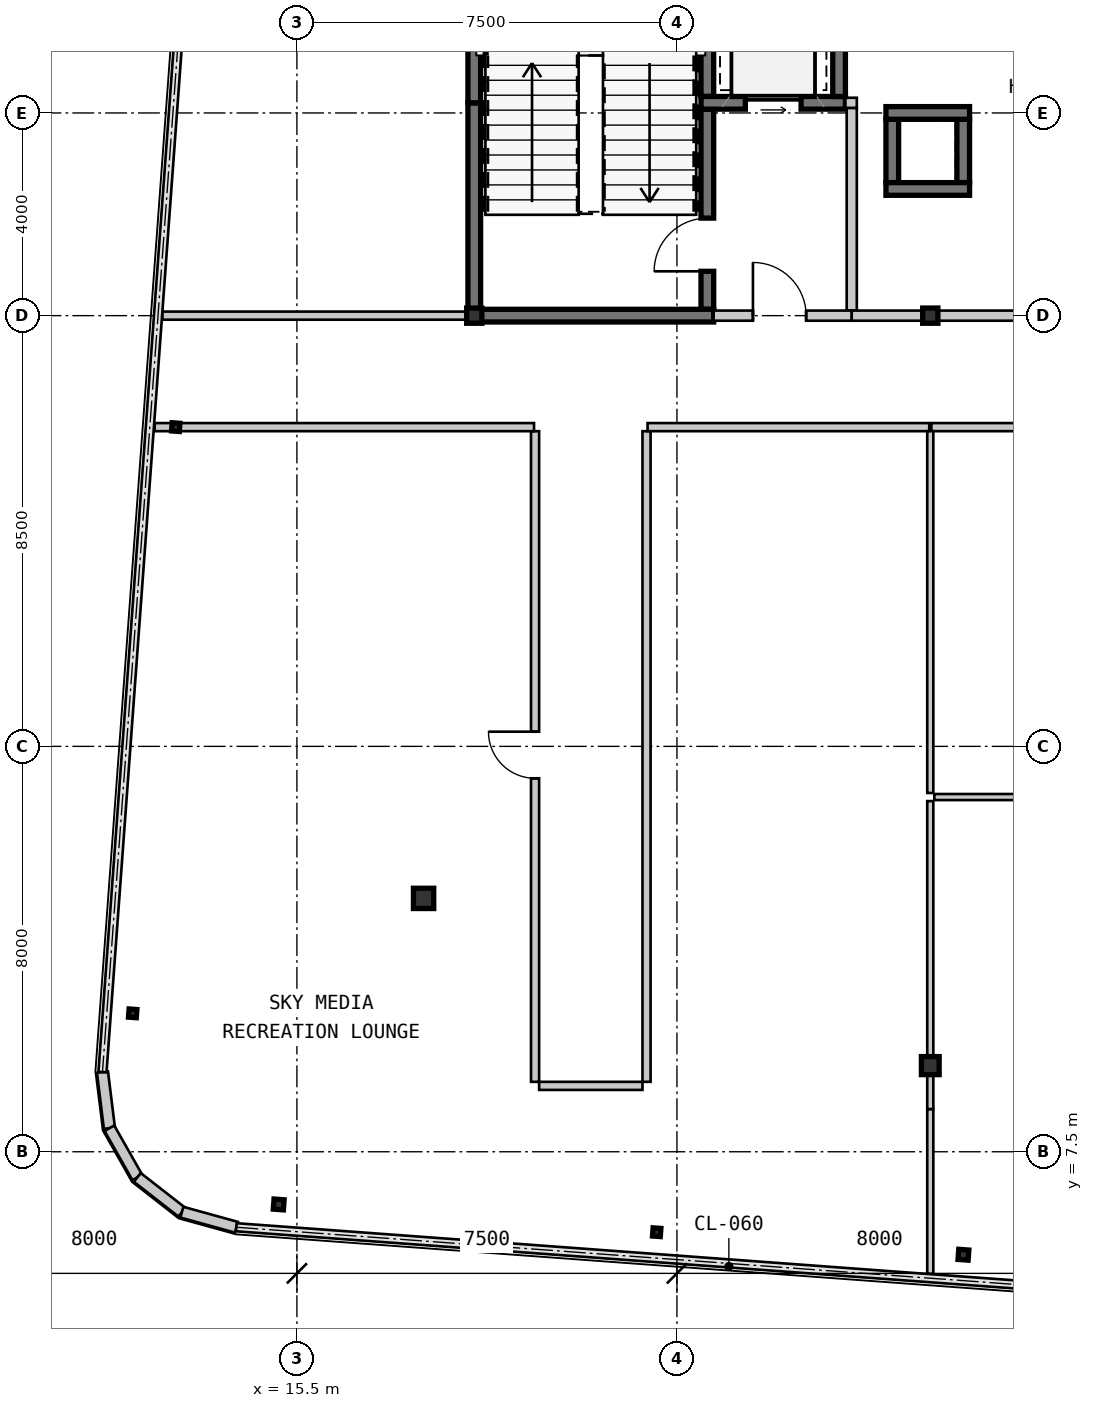
"""IFC4 building model, lengths in metres.
Left out: names, types, materials, properties, quantities, classifications, styles, units other than length and angle.
Written with IfcOpenShell. Run it as: python <this file> out.ifc"""

import sys

from ifc_helpers import new_model, si_unit, direction, frame, frame_2d, origin, origin_2d, place, context, subcontext, project, spatial, rectangle, hollow_rectangle, i_section, extrude, source, transform, mapped, element, fill, save


model = new_model("IFC4")
c1 = context("Model", 3, precision=1e-05, world=origin(), true_north=direction((0.0, 1.0)))
c2 = subcontext(c1, "Body", "Model", "MODEL_VIEW")
j1 = project(units=[si_unit("LENGTHUNIT", "METRE"), si_unit("PLANEANGLEUNIT", "RADIAN")], contexts=[c1])
p1 = place(None, origin())
s1 = spatial("IfcSite", under=j1, at=p1, CompositionType="ELEMENT")
p2 = place(p1, origin())
s2 = spatial("IfcBuilding", under=s1, at=p2, CompositionType="ELEMENT")
p3 = place(p2, frame((0.0, 0.0, 236.6)))
s3 = spatial("IfcBuildingStorey", under=s2, at=p3, CompositionType="ELEMENT", Elevation=236.6)
m1 = source(origin(), c2, "Body", "SweptSolid", [
    extrude(hollow_rectangle(XDim=0.3, YDim=0.3, WallThickness=0.012, at=origin_2d()), origin(), (0.0, 0.0, 1.0), 3.15),
])
for number, where, z_axis, x_axis in (
    (1, (19.0, 24.0, 0.0), (0.0, 0.0, 1.0), (1.0, 0.0, 0.0)),
    (2, (28.0, 24.0, 0.0), (0.0, 0.0, 1.0), (1.0, 0.0, 0.0)),
):
    element("IfcColumn", number, at=place(p3, frame(where, z_axis=z_axis, x_axis=x_axis)), inside=s3, PredefinedType="COLUMN", context=c2, shape_type="MappedRepresentation", body=[
        mapped(m1, transform((0.0, 0.0, 0.0), scale=1.0)),
    ])
m2 = source(origin(), c2, "Body", "SweptSolid", [
    extrude(i_section(OverallWidth=0.35, OverallDepth=0.356, WebThickness=0.018, FlangeThickness=0.028, at=origin_2d()), origin(), (0.0, 0.0, 1.0), 3.15),
])
p4 = place(p3, frame((28.0, 9.2, 0.0), z_axis=(0.0, 0.0, 1.0), x_axis=(1.0, 0.0, 0.0)))
e3 = element("IfcColumn", 3, at=p4, inside=s3, PredefinedType="COLUMN", context=c2, shape_type="MappedRepresentation", body=[
    mapped(m2, transform((0.0, 0.0, 0.0), scale=1.0)),
])
m3 = source(origin(), c2, "Body", "SweptSolid", [
    extrude(hollow_rectangle(XDim=0.4, YDim=0.4, WallThickness=0.016, at=origin_2d()), origin(), (0.0, 0.0, 1.0), 3.15),
])
p5 = place(p3, frame((18.0, 12.5, 0.0), z_axis=(0.0, 0.0, 1.0), x_axis=(1.0, 0.0, 0.0)))
e4 = element("IfcColumn", 4, at=p5, inside=s3, PredefinedType="COLUMN", context=c2, shape_type="MappedRepresentation", body=[
    mapped(m3, transform((0.0, 0.0, 0.0), scale=1.0)),
])
m4 = source(origin(), c2, "Body", "SweptSolid", [
    extrude(hollow_rectangle(XDim=0.2, YDim=0.2, WallThickness=0.009, at=origin_2d()), origin(), (0.0, 0.0, 1.0), 3.15),
])
p6 = place(p3, frame((15.141, 6.46, 0.0), z_axis=(0.0, 0.0, 1.0), x_axis=(0.997314477224, -0.073238197128, 0.0)))
e5 = element("IfcColumn", 5, at=p6, inside=s3, PredefinedType="COLUMN", context=c2, shape_type="MappedRepresentation", body=[
    mapped(m4, transform((0.0, 0.0, 0.0), scale=1.0)),
])
m5 = source(origin(), c2, "Body", "SweptSolid", [
    extrude(i_section(OverallWidth=0.154, OverallDepth=0.162, WebThickness=0.008, FlangeThickness=0.011, at=origin_2d()), origin(), (0.0, 0.0, 1.0), 3.15),
])
for number, where, z_axis, x_axis in (
    (6, (22.601, 5.912, 0.0), (0.0, 0.0, 1.0), (0.997, -0.073, 0.0)),
    (7, (12.259, 10.231, 0.0), (0.0, 0.0, 1.0), (0.997, -0.073, 0.0)),
    (8, (13.109, 21.8, 0.0), (0.0, 0.0, 1.0), (0.997, -0.073, 0.0)),
):
    element("IfcColumn", number, at=place(p3, frame(where, z_axis=z_axis, x_axis=x_axis)), inside=s3, PredefinedType="COLUMN", context=c2, shape_type="MappedRepresentation", body=[
        mapped(m5, transform((0.0, 0.0, 0.0), scale=1.0)),
    ])
p7 = place(p3, frame((28.654, 5.468, 0.0), z_axis=(0.0, 0.0, 1.0), x_axis=(0.997314477224, -0.073238197128, 0.0)))
e9 = element("IfcColumn", 9, at=p7, inside=s3, PredefinedType="COLUMN", context=c2, shape_type="MappedRepresentation", body=[
    mapped(m4, transform((0.0, 0.0, 0.0), scale=1.0)),
])
m6 = source(origin(), c2, "Body", "SweptSolid", [
    extrude(rectangle(XDim=1.116, YDim=0.22, at=frame_2d((0.558, 0.0))), origin(), (0.0, 0.0, 1.0), 2.93),
])
for number, where, z_axis, x_axis in (
    (10, (11.663, 9.072, 0.0), (0.0, 0.0, 1.0), (0.123, -0.992, 0.0)),
    (11, (11.8, 7.965, 0.0), (0.0, 0.0, 1.0), (0.493, -0.87, 0.0)),
    (12, (12.35, 6.994, 0.0), (0.0, 0.0, 1.0), (0.789, -0.615, 0.0)),
):
    element("IfcWall", number, at=place(p3, frame(where, z_axis=z_axis, x_axis=x_axis)), inside=s3, PredefinedType="SOLIDWALL", context=c2, shape_type="MappedRepresentation", body=[
        mapped(m6, transform((0.0, 0.0, 0.0), scale=1.0)),
    ])
m7 = source(origin(), c2, "Body", "SweptSolid", [
    extrude(rectangle(XDim=1.116, YDim=0.22, at=frame_2d((0.558, 0.0))), origin(), (0.0, 0.0, 1.0), 2.93),
])
p8 = place(p3, frame((13.23, 6.307, 0.0), z_axis=(0.0, 0.0, 1.0), x_axis=(0.963890028874, -0.266300605026, 0.0)))
e13 = element("IfcWall", 13, at=p8, inside=s3, PredefinedType="SOLIDWALL", context=c2, shape_type="MappedRepresentation", body=[
    mapped(m7, transform((0.0, 0.0, 0.0), scale=1.0)),
])
m8 = source(origin(), c2, "Body", "SweptSolid", [
    extrude(rectangle(XDim=4.075, YDim=0.25, at=frame_2d((2.038, 0.0))), origin(), (0.0, 0.0, 1.0), 2.93),
])
p9 = place(p3, frame((19.0, 24.125, 0.0), z_axis=(0.0, 0.0, 1.0), x_axis=(0.0, 1.0, 0.0)))
e14 = element("IfcWall", 14, at=p9, inside=s3, PredefinedType="SHEAR", context=c2, shape_type="MappedRepresentation", body=[
    mapped(m8, transform((0.0, 0.0, 0.0), scale=1.0)),
])
m9 = source(origin(), c2, "Body", "SweptSolid", [
    extrude(rectangle(XDim=3.675, YDim=0.25, at=frame_2d((1.837, 0.0))), origin(), (0.0, 0.0, 1.0), 2.93),
])
p10 = place(p3, frame((19.0, 28.2, 0.0), z_axis=(0.0, 0.0, 1.0), x_axis=(0.0, 1.0, 0.0)))
e15 = element("IfcWall", 15, at=p10, inside=s3, PredefinedType="SHEAR", context=c2, shape_type="MappedRepresentation", body=[
    mapped(m9, transform((0.0, 0.0, 0.0), scale=1.0)),
])
m10 = source(origin(), c2, "Body", "SweptSolid", [
    extrude(rectangle(XDim=3.55, YDim=0.25, at=frame_2d((1.775, 0.0))), origin(), (0.0, 0.0, 1.0), 2.93),
])
p11 = place(p3, frame((23.6, 28.325, 0.0), z_axis=(0.0, 0.0, 1.0), x_axis=(0.0, 1.0, 0.0)))
e16 = element("IfcWall", 16, at=p11, inside=s3, PredefinedType="SHEAR", context=c2, shape_type="MappedRepresentation", body=[
    mapped(m10, transform((0.0, 0.0, 0.0), scale=1.0)),
])
m11 = source(origin(), c2, "Body", "SweptSolid", [
    extrude(rectangle(XDim=3.95, YDim=0.25, at=frame_2d((1.975, 0.0))), origin(), (0.0, 0.0, 1.0), 2.93),
])
p12 = place(p3, frame((23.6, 24.125, 0.0), z_axis=(0.0, 0.0, 1.0), x_axis=(0.0, 1.0, 0.0)))
e17 = element("IfcWall", 17, at=p12, inside=s3, PredefinedType="SHEAR", context=c2, shape_type="MappedRepresentation", body=[
    mapped(m11, transform((0.0, 0.0, 0.0), scale=1.0)),
])
m12 = source(origin(), c2, "Body", "SweptSolid", [
    extrude(rectangle(XDim=1.05, YDim=2.1, at=frame_2d((0.525, 1.05))), frame((0.0, 0.135, 0.0), z_axis=(0.0, -1.0, 0.0), x_axis=(1.0, 0.0, 0.0)), (0.0, 0.0, 1.0), 0.27),
])
p13 = place(p12, frame((0.75, 0.0, 0.0)))
e18 = element("IfcOpeningElement", 18, at=p13, cuts=e17, PredefinedType="OPENING", context=c2, shape_type="MappedRepresentation", body=[
    mapped(m12, transform((0.0, 0.0, 0.0), scale=1.0)),
])
m13 = source(origin(), c2, "Body", "SweptSolid", [
    extrude(rectangle(XDim=4.85, YDim=0.25, at=frame_2d((2.425, 0.0))), origin(), (0.0, 0.0, 1.0), 2.93),
])
p14 = place(p3, frame((18.875, 24.0, 0.0), z_axis=(0.0, 0.0, 1.0), x_axis=(1.0, 0.0, 0.0)))
e19 = element("IfcWall", 19, at=p14, inside=s3, PredefinedType="SHEAR", context=c2, shape_type="MappedRepresentation", body=[
    mapped(m13, transform((0.0, 0.0, 0.0), scale=1.0)),
])
m14 = source(origin(), c2, "Body", "SweptSolid", [
    extrude(rectangle(XDim=2.85, YDim=0.25, at=frame_2d((1.425, 0.0))), origin(), (0.0, 0.0, 1.0), 2.93),
])
p15 = place(p3, frame((23.475, 28.2, 0.0), z_axis=(0.0, 0.0, 1.0), x_axis=(1.0, 0.0, 0.0)))
e20 = element("IfcWall", 20, at=p15, inside=s3, PredefinedType="SHEAR", context=c2, shape_type="MappedRepresentation", body=[
    mapped(m14, transform((0.0, 0.0, 0.0), scale=1.0)),
])
m15 = source(origin(), c2, "Body", "SweptSolid", [
    extrude(rectangle(XDim=1.1, YDim=2.15, at=frame_2d((0.55, 1.075))), frame((0.0, 0.135, 0.0), z_axis=(0.0, -1.0, 0.0), x_axis=(1.0, 0.0, 0.0)), (0.0, 0.0, 1.0), 0.27),
])
p16 = place(p15, frame((0.875, 0.0, 0.0)))
e21 = element("IfcOpeningElement", 21, at=p16, cuts=e20, PredefinedType="OPENING", context=c2, shape_type="MappedRepresentation", body=[
    mapped(m15, transform((0.0, 0.0, 0.0), scale=1.0)),
])
p17 = place(p3, frame((26.2, 28.325, 0.0), z_axis=(0.0, 0.0, 1.0), x_axis=(0.0, 1.0, 0.0)))
e22 = element("IfcWall", 22, at=p17, inside=s3, PredefinedType="SHEAR", context=c2, shape_type="MappedRepresentation", body=[
    mapped(m10, transform((0.0, 0.0, 0.0), scale=1.0)),
])
m16 = source(origin(), c2, "Body", "SweptSolid", [
    extrude(rectangle(XDim=4.0, YDim=0.2, at=frame_2d((2.0, 0.0))), origin(), (0.0, 0.0, 1.0), 2.93),
])
p18 = place(p3, frame((26.45, 24.1, 0.0), z_axis=(0.0, 0.0, 1.0), x_axis=(0.0, 1.0, 0.0)))
e23 = element("IfcWall", 23, at=p18, inside=s3, PredefinedType="SOLIDWALL", context=c2, shape_type="MappedRepresentation", body=[
    mapped(m16, transform((0.0, 0.0, 0.0), scale=1.0)),
])
m17 = source(origin(), c2, "Body", "SweptSolid", [
    extrude(rectangle(XDim=2.725, YDim=0.2, at=frame_2d((1.362, 0.0))), origin(), (0.0, 0.0, 1.0), 2.47),
])
p19 = place(p3, frame((23.725, 24.0, 0.0), z_axis=(0.0, 0.0, 1.0), x_axis=(1.0, 0.0, 0.0)))
e24 = element("IfcWall", 24, at=p19, inside=s3, PredefinedType="SOLIDWALL", context=c2, shape_type="MappedRepresentation", body=[
    mapped(m17, transform((0.0, 0.0, 0.0), scale=1.0)),
])
m18 = source(origin(), c2, "Body", "SweptSolid", [
    extrude(rectangle(XDim=1.05, YDim=2.1, at=frame_2d((0.525, 1.05))), frame((0.0, 0.11, 0.0), z_axis=(0.0, -1.0, 0.0), x_axis=(1.0, 0.0, 0.0)), (0.0, 0.0, 1.0), 0.22),
])
p20 = place(p19, frame((0.775, 0.0, 0.0)))
e25 = element("IfcOpeningElement", 25, at=p20, cuts=e24, PredefinedType="OPENING", context=c2, shape_type="MappedRepresentation", body=[
    mapped(m18, transform((0.0, 0.0, 0.0), scale=1.0)),
])
m19 = source(origin(), c2, "Body", "SweptSolid", [
    extrude(rectangle(XDim=1.25, YDim=0.25, at=frame_2d((0.625, 0.0))), origin(), (0.0, 0.0, 1.0), 2.93),
])
for number, where, z_axis, x_axis in (
    (26, (28.65, 26.625, 0.0), (0.0, 0.0, 1.0), (0.0, 1.0, 0.0)),
    (27, (27.25, 27.875, 0.0), (0.0, 0.0, 1.0), (0.0, -1.0, 0.0)),
):
    element("IfcWall", number, at=place(p3, frame(where, z_axis=z_axis, x_axis=x_axis)), inside=s3, PredefinedType="SHEAR", context=c2, shape_type="MappedRepresentation", body=[
        mapped(m19, transform((0.0, 0.0, 0.0), scale=1.0)),
    ])
m20 = source(origin(), c2, "Body", "SweptSolid", [
    extrude(rectangle(XDim=1.65, YDim=0.25, at=frame_2d((0.825, 0.0))), origin(), (0.0, 0.0, 1.0), 2.93),
])
for number, where, z_axis, x_axis in (
    (28, (28.775, 28.0, 0.0), (0.0, 0.0, 1.0), (-1.0, 0.0, 0.0)),
    (29, (27.125, 26.5, 0.0), (0.0, 0.0, 1.0), (1.0, 0.0, 0.0)),
):
    element("IfcWall", number, at=place(p3, frame(where, z_axis=z_axis, x_axis=x_axis)), inside=s3, PredefinedType="SHEAR", context=c2, shape_type="MappedRepresentation", body=[
        mapped(m20, transform((0.0, 0.0, 0.0), scale=1.0)),
    ])
m21 = source(origin(), c2, "Body", "SweptSolid", [
    extrude(rectangle(XDim=8.7, YDim=0.2, at=frame_2d((4.35, 0.0))), origin(), (0.0, 0.0, 1.0), 2.47),
])
p21 = place(p3, frame((35.15, 24.0, 0.0), z_axis=(0.0, 0.0, 1.0), x_axis=(-1.0, 0.0, 0.0)))
e30 = element("IfcWall", 30, at=p21, inside=s3, PredefinedType="SOLIDWALL", context=c2, shape_type="MappedRepresentation", body=[
    mapped(m21, transform((0.0, 0.0, 0.0), scale=1.0)),
])
p22 = place(p21, frame((3.825, 0.0, 0.0)))
e31 = element("IfcOpeningElement", 31, at=p22, cuts=e30, PredefinedType="OPENING", context=c2, shape_type="MappedRepresentation", body=[
    mapped(m18, transform((0.0, 0.0, 0.0), scale=1.0)),
])
m22 = source(origin(), c2, "Body", "SweptSolid", [
    extrude(rectangle(XDim=13.959, YDim=0.16, at=frame_2d((6.98, 0.0))), origin(), (0.0, 0.0, 1.0), 2.93),
])
p23 = place(p3, frame((41.98, 21.8, 0.0), z_axis=(0.0, 0.0, 1.0), x_axis=(-1.0, 0.0, 0.0)))
e32 = element("IfcWall", 32, at=p23, inside=s3, PredefinedType="PARTITIONING", context=c2, shape_type="MappedRepresentation", body=[
    mapped(m22, transform((0.0, 0.0, 0.0), scale=1.0)),
])
m23 = source(origin(), c2, "Body", "SweptSolid", [
    extrude(rectangle(XDim=1.05, YDim=2.1, at=frame_2d((0.525, 1.05))), frame((0.0, 0.09, 0.0), z_axis=(0.0, -1.0, 0.0), x_axis=(1.0, 0.0, 0.0)), (0.0, 0.0, 1.0), 0.18),
])
p24 = place(p23, frame((6.455, 0.0, 0.0)))
e33 = element("IfcOpeningElement", 33, at=p24, cuts=e32, PredefinedType="OPENING", context=c2, shape_type="MappedRepresentation", body=[
    mapped(m23, transform((0.0, 0.0, 0.0), scale=1.0)),
])
m24 = source(origin(), c2, "Body", "SweptSolid", [
    extrude(rectangle(XDim=12.84, YDim=0.16, at=frame_2d((6.42, 0.0))), origin(), (0.0, 0.0, 1.0), 2.93),
])
p25 = place(p3, frame((20.2, 8.88, 0.0), z_axis=(0.0, 0.0, 1.0), x_axis=(0.0, 1.0, 0.0)))
e34 = element("IfcWall", 34, at=p25, inside=s3, PredefinedType="PARTITIONING", context=c2, shape_type="MappedRepresentation", body=[
    mapped(m24, transform((0.0, 0.0, 0.0), scale=1.0)),
])
m25 = source(origin(), c2, "Body", "SweptSolid", [
    extrude(rectangle(XDim=0.92, YDim=2.1, at=frame_2d((0.46, 1.05))), frame((0.0, 0.09, 0.0), z_axis=(0.0, -1.0, 0.0), x_axis=(1.0, 0.0, 0.0)), (0.0, 0.0, 1.0), 0.18),
])
p26 = place(p25, frame((5.99, 0.0, 0.0)))
e35 = element("IfcOpeningElement", 35, at=p26, cuts=e34, PredefinedType="OPENING", context=c2, shape_type="MappedRepresentation", body=[
    mapped(m25, transform((0.0, 0.0, 0.0), scale=1.0)),
])
p27 = place(p3, frame((22.4, 21.72, 0.0), z_axis=(0.0, 0.0, 1.0), x_axis=(0.0, -1.0, 0.0)))
e36 = element("IfcWall", 36, at=p27, inside=s3, PredefinedType="PARTITIONING", context=c2, shape_type="MappedRepresentation", body=[
    mapped(m24, transform((0.0, 0.0, 0.0), scale=1.0)),
])
m26 = source(origin(), c2, "Body", "SweptSolid", [
    extrude(rectangle(XDim=7.486, YDim=0.16, at=frame_2d((3.743, 0.0))), origin(), (0.0, 0.0, 1.0), 2.93),
])
p28 = place(p3, frame((20.18, 21.8, 0.0), z_axis=(0.0, 0.0, 1.0), x_axis=(-1.0, 0.0, 0.0)))
e37 = element("IfcWall", 37, at=p28, inside=s3, PredefinedType="PARTITIONING", context=c2, shape_type="MappedRepresentation", body=[
    mapped(m26, transform((0.0, 0.0, 0.0), scale=1.0)),
])
m27 = source(origin(), c2, "Body", "SweptSolid", [
    extrude(rectangle(XDim=5.559, YDim=0.16, at=frame_2d((2.78, 0.0))), origin(), (0.0, 0.0, 1.0), 2.93),
])
p29 = place(p3, frame((27.98, 21.8, 0.0), z_axis=(0.0, 0.0, 1.0), x_axis=(-1.0, 0.0, 0.0)))
e38 = element("IfcWall", 38, at=p29, inside=s3, PredefinedType="PARTITIONING", context=c2, shape_type="MappedRepresentation", body=[
    mapped(m27, transform((0.0, 0.0, 0.0), scale=1.0)),
])
m28 = source(origin(), c2, "Body", "SweptSolid", [
    extrude(rectangle(XDim=2.04, YDim=0.16, at=frame_2d((1.02, 0.0))), origin(), (0.0, 0.0, 1.0), 2.93),
])
p30 = place(p3, frame((22.32, 8.8, 0.0), z_axis=(0.0, 0.0, 1.0), x_axis=(-1.0, 0.0, 0.0)))
e39 = element("IfcWall", 39, at=p30, inside=s3, PredefinedType="PARTITIONING", context=c2, shape_type="MappedRepresentation", body=[
    mapped(m28, transform((0.0, 0.0, 0.0), scale=1.0)),
])
m29 = source(origin(), c2, "Body", "SweptSolid", [
    extrude(rectangle(XDim=6.032, YDim=0.16, at=frame_2d((3.016, 0.0))), origin(), (0.0, 0.0, 1.0), 2.93),
])
p31 = place(p3, frame((12.843, 24.0, 0.0), z_axis=(0.0, 0.0, 1.0), x_axis=(1.0, 0.0, 0.0)))
e40 = element("IfcWall", 40, at=p31, inside=s3, PredefinedType="PARTITIONING", context=c2, shape_type="MappedRepresentation", body=[
    mapped(m29, transform((0.0, 0.0, 0.0), scale=1.0)),
])
m30 = source(origin(), c2, "Body", "SweptSolid", [
    extrude(rectangle(XDim=13.84, YDim=0.12, at=frame_2d((6.92, 0.0))), origin(), (0.0, 0.0, 1.0), 2.93),
])
p32 = place(p3, frame((28.08, 14.5, 0.0), z_axis=(0.0, 0.0, 1.0), x_axis=(1.0, 0.0, 0.0)))
e41 = element("IfcWall", 41, at=p32, inside=s3, PredefinedType="PARTITIONING", context=c2, shape_type="MappedRepresentation", body=[
    mapped(m30, transform((0.0, 0.0, 0.0), scale=1.0)),
])
m31 = source(origin(), c2, "Body", "SweptSolid", [
    extrude(rectangle(XDim=0.86, YDim=2.1, at=frame_2d((0.43, 1.05))), frame((0.0, 0.07, 0.0), z_axis=(0.0, -1.0, 0.0), x_axis=(1.0, 0.0, 0.0)), (0.0, 0.0, 1.0), 0.14),
])
p33 = place(p32, frame((6.49, 0.0, 0.0)))
e42 = element("IfcOpeningElement", 42, at=p33, cuts=e41, PredefinedType="OPENING", context=c2, shape_type="MappedRepresentation", body=[
    mapped(m31, transform((0.0, 0.0, 0.0), scale=1.0)),
])
m32 = source(origin(), c2, "Body", "SweptSolid", [
    extrude(rectangle(XDim=3.253, YDim=0.12, at=frame_2d((1.627, 0.0))), origin(), (0.0, 0.0, 1.0), 2.93),
])
p34 = place(p3, frame((28.0, 5.089, 0.0), z_axis=(0.0, 0.0, 1.0), x_axis=(0.0, 1.0, 0.0)))
e43 = element("IfcWall", 43, at=p34, inside=s3, PredefinedType="PARTITIONING", context=c2, shape_type="MappedRepresentation", body=[
    mapped(m32, transform((0.0, 0.0, 0.0), scale=1.0)),
])
m33 = source(origin(), c2, "Body", "SweptSolid", [
    extrude(rectangle(XDim=0.858, YDim=0.12, at=frame_2d((0.429, 0.0))), origin(), (0.0, 0.0, 1.0), 2.524),
])
p35 = place(p3, frame((28.0, 8.342, 0.0), z_axis=(0.0, 0.0, 1.0), x_axis=(0.0, 1.0, 0.0)))
e44 = element("IfcWall", 44, at=p35, inside=s3, PredefinedType="PARTITIONING", context=c2, shape_type="MappedRepresentation", body=[
    mapped(m33, transform((0.0, 0.0, 0.0), scale=1.0)),
])
m34 = source(origin(), c2, "Body", "SweptSolid", [
    extrude(rectangle(XDim=5.22, YDim=0.12, at=frame_2d((2.61, 0.0))), origin(), (0.0, 0.0, 1.0), 2.328),
])
p36 = place(p3, frame((28.0, 9.2, 0.0), z_axis=(0.0, 0.0, 1.0), x_axis=(0.0, 1.0, 0.0)))
e45 = element("IfcWall", 45, at=p36, inside=s3, PredefinedType="PARTITIONING", context=c2, shape_type="MappedRepresentation", body=[
    mapped(m34, transform((0.0, 0.0, 0.0), scale=1.0)),
])
m35 = source(origin(), c2, "Body", "SweptSolid", [
    extrude(rectangle(XDim=7.14, YDim=0.12, at=frame_2d((3.57, 0.0))), origin(), (0.0, 0.0, 1.0), 2.328),
])
p37 = place(p3, frame((28.0, 14.58, 0.0), z_axis=(0.0, 0.0, 1.0), x_axis=(0.0, 1.0, 0.0)))
e46 = element("IfcWall", 46, at=p37, inside=s3, PredefinedType="PARTITIONING", context=c2, shape_type="MappedRepresentation", body=[
    mapped(m35, transform((0.0, 0.0, 0.0), scale=1.0)),
])
m36 = source(origin(), c2, "Body", "SweptSolid", [
    extrude(rectangle(XDim=0.225, YDim=0.2, at=frame_2d((0.113, 0.0))), origin(), (0.0, 0.0, 1.0), 2.93),
])
p38 = place(p3, frame((26.325, 28.2, 0.0), z_axis=(0.0, 0.0, 1.0), x_axis=(1.0, 0.0, 0.0)))
e47 = element("IfcWall", 47, at=p38, inside=s3, PredefinedType="SOLIDWALL", context=c2, shape_type="MappedRepresentation", body=[
    mapped(m36, transform((0.0, 0.0, 0.0), scale=1.0)),
])
m37 = source(origin(), c2, "Body", "SweptSolid", [
    extrude(rectangle(XDim=1.05, YDim=2.1, at=frame_2d((0.525, 1.05))), frame((0.0, 0.025, 0.0), z_axis=(0.0, -1.0, 0.0), x_axis=(1.0, 0.0, 0.0)), (0.0, 0.0, 1.0), 0.05),
])
p39 = place(p13, origin())
e48 = element("IfcDoor", 48, at=p39, inside=s3, OperationType="SINGLE_SWING_LEFT", PredefinedType="DOOR", context=c2, shape_type="MappedRepresentation", body=[
    mapped(m37, transform((0.0, 0.0, 0.0), scale=1.0)),
])
fill(e18, e48)
m38 = source(origin(), c2, "Body", "SweptSolid", [
    extrude(rectangle(XDim=1.1, YDim=2.15, at=frame_2d((0.55, 1.075))), frame((0.0, 0.025, 0.0), z_axis=(0.0, -1.0, 0.0), x_axis=(1.0, 0.0, 0.0)), (0.0, 0.0, 1.0), 0.05),
])
p40 = place(p16, origin())
e49 = element("IfcDoor", 49, at=p40, inside=s3, OperationType="SLIDING_TO_LEFT", PredefinedType="DOOR", context=c2, shape_type="MappedRepresentation", body=[
    mapped(m38, transform((0.0, 0.0, 0.0), scale=1.0)),
])
fill(e21, e49)
p41 = place(p20, origin())
e50 = element("IfcDoor", 50, at=p41, inside=s3, OperationType="SINGLE_SWING_LEFT", PredefinedType="DOOR", context=c2, shape_type="MappedRepresentation", body=[
    mapped(m37, transform((0.0, 0.0, 0.0), scale=1.0)),
])
fill(e25, e50)
m39 = source(origin(), c2, "Body", "SweptSolid", [
    extrude(rectangle(XDim=0.92, YDim=2.1, at=frame_2d((0.46, 1.05))), frame((0.0, 0.025, 0.0), z_axis=(0.0, -1.0, 0.0), x_axis=(1.0, 0.0, 0.0)), (0.0, 0.0, 1.0), 0.05),
])
p42 = place(p26, origin())
e51 = element("IfcDoor", 51, at=p42, inside=s3, OperationType="SINGLE_SWING_RIGHT", PredefinedType="DOOR", context=c2, shape_type="MappedRepresentation", body=[
    mapped(m39, transform((0.0, 0.0, 0.0), scale=1.0)),
])
fill(e35, e51)
save(model, sys.argv[1])
